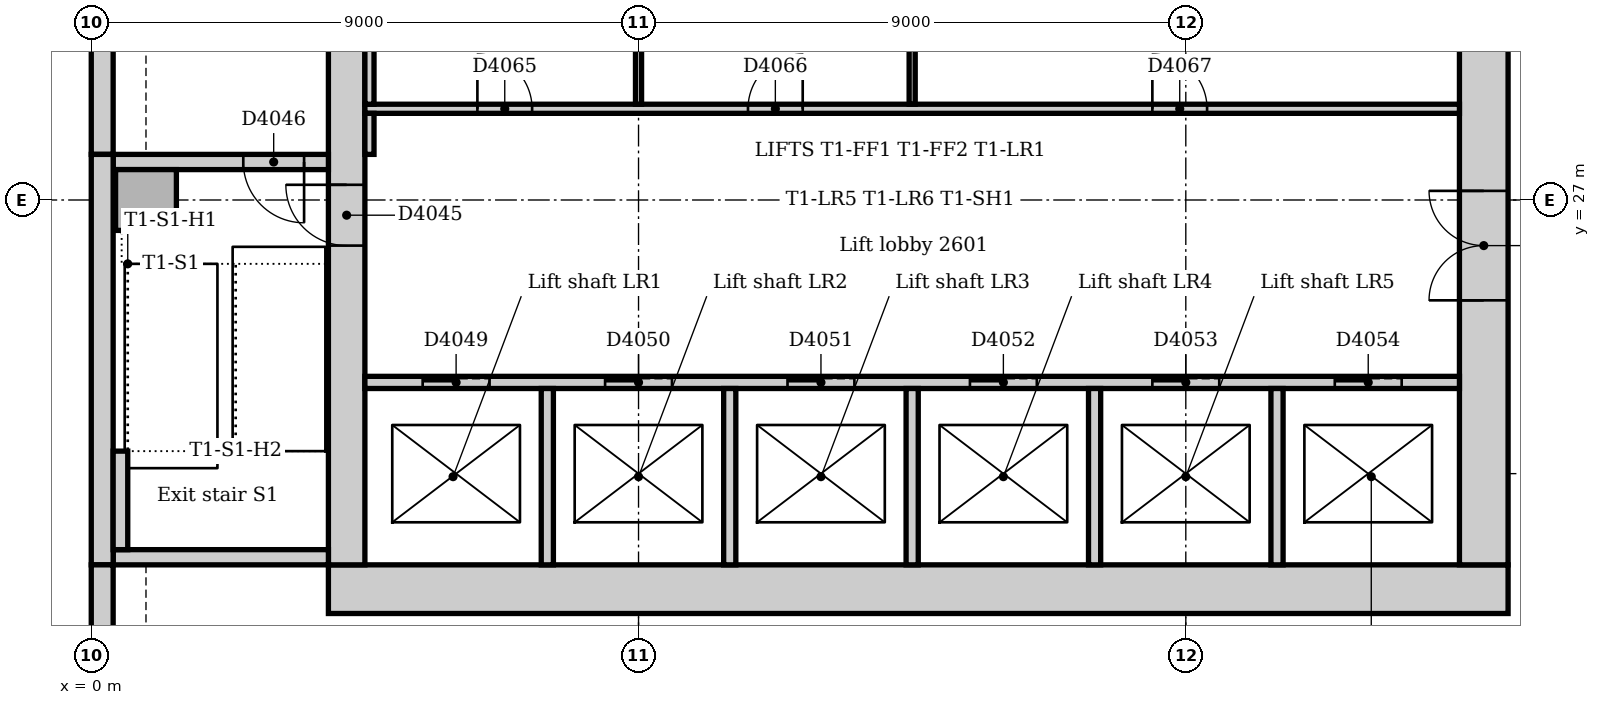
"""IFC4 building model, lengths in metres.
Left out: names, types, materials, properties, quantities, classifications, styles, units other than length and angle.
Written with IfcOpenShell. Run it as: python <this file> out.ifc"""

import sys

from ifc_helpers import new_model, si_unit, direction, frame, frame_2d, origin, origin_2d, place, context, subcontext, project, spatial, rectangle, extrude, element, fill, save


model = new_model("IFC4")
c1 = context("Model", 3, precision=1e-05, world=origin(), true_north=direction((0.0, 1.0)))
c2 = subcontext(c1, "Body", "Model", "MODEL_VIEW")
j1 = project(units=[si_unit("LENGTHUNIT", "METRE"), si_unit("PLANEANGLEUNIT", "RADIAN")], contexts=[c1])
p1 = place(None, origin())
s1 = spatial("IfcSite", under=j1, at=p1, CompositionType="ELEMENT")
p2 = place(p1, origin())
s2 = spatial("IfcBuilding", under=s1, at=p2, CompositionType="ELEMENT")
p3 = place(p2, frame((0.0, 0.0, 112.0)))
s3 = spatial("IfcBuildingStorey", under=s2, at=p3, CompositionType="ELEMENT", Elevation=112.0)
p4 = place(p3, frame((3.9, 20.6, 0.0), z_axis=(0.0, 0.0, 1.0), x_axis=(1.0, 0.0, 0.0)))
e1 = element("IfcWall", 1, at=p4, inside=s3, PredefinedType="SOLIDWALL", context=c2, shape_type="SweptSolid", body=[
    extrude(rectangle(XDim=19.4, YDim=0.8, at=frame_2d((9.7, 0.0))), origin(), (0.0, 0.0, 1.0), 4.0),
])
p5 = place(p3, frame((22.9, 21.0, 0.0), z_axis=(0.0, 0.0, 1.0), x_axis=(0.0, 1.0, 0.0)))
e2 = element("IfcWall", 2, at=p5, inside=s3, PredefinedType="SOLIDWALL", context=c2, shape_type="SweptSolid", body=[
    extrude(rectangle(XDim=10.5, YDim=0.8, at=frame_2d((5.25, 0.0))), origin(), (0.0, 0.0, 1.0), 4.0),
])
p6 = place(p5, frame((4.35, 0.0, 0.0)))
e3 = element("IfcOpeningElement", 3, at=p6, cuts=e2, PredefinedType="OPENING", context=c2, shape_type="SweptSolid", body=[
    extrude(rectangle(XDim=1.8, YDim=2.1, at=frame_2d((0.9, 1.05))), frame((0.0, 0.41, 0.0), z_axis=(0.0, -1.0, 0.0), x_axis=(1.0, 0.0, 0.0)), (0.0, 0.0, 1.0), 0.82),
])
p7 = place(p3, frame((4.2, 31.5, 0.0), z_axis=(0.0, 0.0, 1.0), x_axis=(0.0, -1.0, 0.0)))
e4 = element("IfcWall", 4, at=p7, inside=s3, PredefinedType="SOLIDWALL", context=c2, shape_type="SweptSolid", body=[
    extrude(rectangle(XDim=10.5, YDim=0.6, at=frame_2d((5.25, 0.0))), origin(), (0.0, 0.0, 1.0), 4.0),
])
p8 = place(p7, frame((4.25, 0.0, 0.0)))
e5 = element("IfcOpeningElement", 5, at=p8, cuts=e4, PredefinedType="OPENING", context=c2, shape_type="SweptSolid", body=[
    extrude(rectangle(XDim=1.0, YDim=2.1, at=frame_2d((0.5, 1.05))), frame((0.0, 0.31, 0.0), z_axis=(0.0, -1.0, 0.0), x_axis=(1.0, 0.0, 0.0)), (0.0, 0.0, 1.0), 0.62),
])
p9 = place(p3, frame((0.36, 21.125, 0.0), z_axis=(0.0, 0.0, 1.0), x_axis=(1.0, 0.0, 0.0)))
e6 = element("IfcWall", 6, at=p9, inside=s3, PredefinedType="SOLIDWALL", context=c2, shape_type="SweptSolid", body=[
    extrude(rectangle(XDim=3.54, YDim=0.25, at=frame_2d((1.77, 0.0))), origin(), (0.0, 0.0, 1.0), 4.0),
])
p10 = place(p3, frame((3.9, 27.625, 0.0), z_axis=(0.0, 0.0, 1.0), x_axis=(-1.0, 0.0, 0.0)))
e7 = element("IfcWall", 7, at=p10, inside=s3, PredefinedType="SOLIDWALL", context=c2, shape_type="SweptSolid", body=[
    extrude(rectangle(XDim=3.54, YDim=0.25, at=frame_2d((1.77, 0.0))), origin(), (0.0, 0.0, 1.0), 4.0),
])
p11 = place(p10, frame((0.4, 0.0, 0.0)))
e8 = element("IfcOpeningElement", 8, at=p11, cuts=e7, PredefinedType="OPENING", context=c2, shape_type="SweptSolid", body=[
    extrude(rectangle(XDim=1.0, YDim=2.1, at=frame_2d((0.5, 1.05))), frame((0.0, 0.135, 0.0), z_axis=(0.0, -1.0, 0.0), x_axis=(1.0, 0.0, 0.0)), (0.0, 0.0, 1.0), 0.27),
])
p12 = place(p3, frame((0.9, 27.0, 0.0), z_axis=(0.0, 0.0, 1.0), x_axis=(1.0, 0.0, 0.0)))
e9 = element("IfcColumn", 9, at=p12, inside=s3, PredefinedType="COLUMN", context=c2, shape_type="SweptSolid", body=[
    extrude(rectangle(XDim=1.0, YDim=1.0, at=origin_2d()), origin(), (0.0, 0.0, 1.0), 4.0),
])
p13 = place(p3, frame((0.18, 35.25, 0.0), z_axis=(0.0, 0.0, 1.0), x_axis=(0.0, -1.0, 0.0)))
e10 = element("IfcWall", 10, at=p13, inside=s3, PredefinedType="STANDARD", context=c2, shape_type="SweptSolid", body=[
    extrude(rectangle(XDim=7.5, YDim=0.36, at=frame_2d((3.75, 0.0))), origin(), (0.0, 0.0, 1.0), 3.85),
])
p14 = place(p3, frame((0.18, 27.75, 0.0), z_axis=(0.0, 0.0, 1.0), x_axis=(0.0, -1.0, 0.0)))
e11 = element("IfcWall", 11, at=p14, inside=s3, PredefinedType="STANDARD", context=c2, shape_type="SweptSolid", body=[
    extrude(rectangle(XDim=6.75, YDim=0.36, at=frame_2d((3.375, 0.0))), origin(), (0.0, 0.0, 1.0), 3.85),
])
p15 = place(p3, frame((0.18, 21.0, 0.0), z_axis=(0.0, 0.0, 1.0), x_axis=(0.0, -1.0, 0.0)))
e12 = element("IfcWall", 12, at=p15, inside=s3, PredefinedType="STANDARD", context=c2, shape_type="SweptSolid", body=[
    extrude(rectangle(XDim=12.257, YDim=0.36, at=frame_2d((6.129, 0.0))), origin(), (0.0, 0.0, 1.0), 3.85),
])
p16 = place(p15, frame((1.35, 0.0, 0.9)))
e13 = element("IfcOpeningElement", 13, at=p16, cuts=e12, PredefinedType="OPENING", context=c2, shape_type="SweptSolid", body=[
    extrude(rectangle(XDim=3.3, YDim=1.6, at=frame_2d((1.65, 0.8))), frame((0.0, 0.19, 0.0), z_axis=(0.0, -1.0, 0.0), x_axis=(1.0, 0.0, 0.0)), (0.0, 0.0, 1.0), 0.38),
])
p17 = place(p15, frame((5.85, 0.0, 0.9)))
e14 = element("IfcOpeningElement", 14, at=p17, cuts=e12, PredefinedType="OPENING", context=c2, shape_type="SweptSolid", body=[
    extrude(rectangle(XDim=3.3, YDim=1.6, at=frame_2d((1.65, 0.8))), frame((0.0, 0.19, 0.0), z_axis=(0.0, -1.0, 0.0), x_axis=(1.0, 0.0, 0.0)), (0.0, 0.0, 1.0), 0.38),
])
p18 = place(p3, frame((0.48, 21.25, 0.0), z_axis=(0.0, 0.0, 1.0), x_axis=(0.0, 1.0, 0.0)))
e15 = element("IfcWall", 15, at=p18, inside=s3, PredefinedType="STANDARD", context=c2, shape_type="SweptSolid", body=[
    extrude(rectangle(XDim=1.62, YDim=0.24, at=frame_2d((0.81, 0.0))), origin(), (0.0, 0.0, 1.0), 4.0),
])
p19 = place(p3, frame((4.5, 24.0, 0.0), z_axis=(0.0, 0.0, 1.0), x_axis=(1.0, 0.0, 0.0)))
e16 = element("IfcWall", 16, at=p19, inside=s3, PredefinedType="PARTITIONING", context=c2, shape_type="SweptSolid", body=[
    extrude(rectangle(XDim=18.0, YDim=0.2, at=frame_2d((9.0, 0.0))), origin(), (0.0, 0.0, 1.0), 3.85),
])
p20 = place(p19, frame((0.95, 0.0, 0.0)))
e17 = element("IfcOpeningElement", 17, at=p20, cuts=e16, PredefinedType="OPENING", context=c2, shape_type="SweptSolid", body=[
    extrude(rectangle(XDim=1.1, YDim=2.1, at=frame_2d((0.55, 1.05))), frame((0.0, 0.11, 0.0), z_axis=(0.0, -1.0, 0.0), x_axis=(1.0, 0.0, 0.0)), (0.0, 0.0, 1.0), 0.22),
])
p21 = place(p19, frame((3.95, 0.0, 0.0)))
e18 = element("IfcOpeningElement", 18, at=p21, cuts=e16, PredefinedType="OPENING", context=c2, shape_type="SweptSolid", body=[
    extrude(rectangle(XDim=1.1, YDim=2.1, at=frame_2d((0.55, 1.05))), frame((0.0, 0.11, 0.0), z_axis=(0.0, -1.0, 0.0), x_axis=(1.0, 0.0, 0.0)), (0.0, 0.0, 1.0), 0.22),
])
p22 = place(p19, frame((6.95, 0.0, 0.0)))
e19 = element("IfcOpeningElement", 19, at=p22, cuts=e16, PredefinedType="OPENING", context=c2, shape_type="SweptSolid", body=[
    extrude(rectangle(XDim=1.1, YDim=2.1, at=frame_2d((0.55, 1.05))), frame((0.0, 0.11, 0.0), z_axis=(0.0, -1.0, 0.0), x_axis=(1.0, 0.0, 0.0)), (0.0, 0.0, 1.0), 0.22),
])
p23 = place(p19, frame((9.95, 0.0, 0.0)))
e20 = element("IfcOpeningElement", 20, at=p23, cuts=e16, PredefinedType="OPENING", context=c2, shape_type="SweptSolid", body=[
    extrude(rectangle(XDim=1.1, YDim=2.1, at=frame_2d((0.55, 1.05))), frame((0.0, 0.11, 0.0), z_axis=(0.0, -1.0, 0.0), x_axis=(1.0, 0.0, 0.0)), (0.0, 0.0, 1.0), 0.22),
])
p24 = place(p19, frame((12.95, 0.0, 0.0)))
e21 = element("IfcOpeningElement", 21, at=p24, cuts=e16, PredefinedType="OPENING", context=c2, shape_type="SweptSolid", body=[
    extrude(rectangle(XDim=1.1, YDim=2.1, at=frame_2d((0.55, 1.05))), frame((0.0, 0.11, 0.0), z_axis=(0.0, -1.0, 0.0), x_axis=(1.0, 0.0, 0.0)), (0.0, 0.0, 1.0), 0.22),
])
p25 = place(p19, frame((15.95, 0.0, 0.0)))
e22 = element("IfcOpeningElement", 22, at=p25, cuts=e16, PredefinedType="OPENING", context=c2, shape_type="SweptSolid", body=[
    extrude(rectangle(XDim=1.1, YDim=2.1, at=frame_2d((0.55, 1.05))), frame((0.0, 0.11, 0.0), z_axis=(0.0, -1.0, 0.0), x_axis=(1.0, 0.0, 0.0)), (0.0, 0.0, 1.0), 0.22),
])
for number, where, z_axis, x_axis in (
    (23, (7.5, 21.0, 0.0), (0.0, 0.0, 1.0), (0.0, 1.0, 0.0)),
    (24, (10.5, 21.0, 0.0), (0.0, 0.0, 1.0), (0.0, 1.0, 0.0)),
    (25, (13.5, 21.0, 0.0), (0.0, 0.0, 1.0), (0.0, 1.0, 0.0)),
    (26, (16.5, 21.0, 0.0), (0.0, 0.0, 1.0), (0.0, 1.0, 0.0)),
    (27, (19.5, 21.0, 0.0), (0.0, 0.0, 1.0), (0.0, 1.0, 0.0)),
):
    element("IfcWall", number, at=place(p3, frame(where, z_axis=z_axis, x_axis=x_axis)), inside=s3, PredefinedType="PARTITIONING", context=c2, shape_type="SweptSolid", body=[
        extrude(rectangle(XDim=2.9, YDim=0.2, at=frame_2d((1.45, 0.0))), origin(), (0.0, 0.0, 1.0), 3.85),
    ])
p26 = place(p3, frame((4.5, 28.5, 0.0), z_axis=(0.0, 0.0, 1.0), x_axis=(1.0, 0.0, 0.0)))
e28 = element("IfcWall", 28, at=p26, inside=s3, PredefinedType="PARTITIONING", context=c2, shape_type="SweptSolid", body=[
    extrude(rectangle(XDim=18.0, YDim=0.15, at=frame_2d((9.0, 0.0))), origin(), (0.0, 0.0, 1.0), 3.85),
])
p27 = place(p26, frame((1.85, 0.0, 0.0)))
e29 = element("IfcOpeningElement", 29, at=p27, cuts=e28, PredefinedType="OPENING", context=c2, shape_type="SweptSolid", body=[
    extrude(rectangle(XDim=0.9, YDim=2.1, at=frame_2d((0.45, 1.05))), frame((0.0, 0.085, 0.0), z_axis=(0.0, -1.0, 0.0), x_axis=(1.0, 0.0, 0.0)), (0.0, 0.0, 1.0), 0.17),
])
p28 = place(p26, frame((6.3, 0.0, 0.0)))
e30 = element("IfcOpeningElement", 30, at=p28, cuts=e28, PredefinedType="OPENING", context=c2, shape_type="SweptSolid", body=[
    extrude(rectangle(XDim=0.9, YDim=2.1, at=frame_2d((0.45, 1.05))), frame((0.0, 0.085, 0.0), z_axis=(0.0, -1.0, 0.0), x_axis=(1.0, 0.0, 0.0)), (0.0, 0.0, 1.0), 0.17),
])
p29 = place(p26, frame((12.95, 0.0, 0.0)))
e31 = element("IfcOpeningElement", 31, at=p29, cuts=e28, PredefinedType="OPENING", context=c2, shape_type="SweptSolid", body=[
    extrude(rectangle(XDim=0.9, YDim=2.1, at=frame_2d((0.45, 1.05))), frame((0.0, 0.085, 0.0), z_axis=(0.0, -1.0, 0.0), x_axis=(1.0, 0.0, 0.0)), (0.0, 0.0, 1.0), 0.17),
])
p30 = place(p3, frame((4.575, 27.75, 0.0), z_axis=(0.0, 0.0, 1.0), x_axis=(0.0, 1.0, 0.0)))
e32 = element("IfcWall", 32, at=p30, inside=s3, PredefinedType="PARTITIONING", context=c2, shape_type="SweptSolid", body=[
    extrude(rectangle(XDim=0.675, YDim=0.15, at=frame_2d((0.338, 0.0))), origin(), (0.0, 0.0, 1.0), 3.85),
])
p31 = place(p3, frame((4.575, 28.575, 0.0), z_axis=(0.0, 0.0, 1.0), x_axis=(0.0, 1.0, 0.0)))
e33 = element("IfcWall", 33, at=p31, inside=s3, PredefinedType="PARTITIONING", context=c2, shape_type="SweptSolid", body=[
    extrude(rectangle(XDim=2.675, YDim=0.15, at=frame_2d((1.337, 0.0))), origin(), (0.0, 0.0, 1.0), 3.85),
])
for number, where, z_axis, x_axis in (
    (34, (9.0, 28.575, 0.0), (0.0, 0.0, 1.0), (0.0, 1.0, 0.0)),
    (35, (13.5, 28.575, 0.0), (0.0, 0.0, 1.0), (0.0, 1.0, 0.0)),
):
    element("IfcWall", number, at=place(p3, frame(where, z_axis=z_axis, x_axis=x_axis)), inside=s3, PredefinedType="PARTITIONING", context=c2, shape_type="SweptSolid", body=[
        extrude(rectangle(XDim=2.675, YDim=0.1, at=frame_2d((1.337, 0.0))), origin(), (0.0, 0.0, 1.0), 3.85),
    ])
p32 = place(p8, frame((1.0, 0.0, 0.0), z_axis=(0.0, 0.0, 1.0), x_axis=(-1.0, 0.0, 0.0)))
e36 = element("IfcDoor", 36, at=p32, inside=s3, OperationType="SINGLE_SWING_RIGHT", PredefinedType="DOOR", context=c2, shape_type="SweptSolid", body=[
    extrude(rectangle(XDim=1.0, YDim=2.1, at=frame_2d((0.5, 1.05))), frame((0.0, 0.025, 0.0), z_axis=(0.0, -1.0, 0.0), x_axis=(1.0, 0.0, 0.0)), (0.0, 0.0, 1.0), 0.05),
])
fill(e5, e36)
p33 = place(p11, origin())
e37 = element("IfcDoor", 37, at=p33, inside=s3, OperationType="SINGLE_SWING_LEFT", PredefinedType="DOOR", context=c2, shape_type="SweptSolid", body=[
    extrude(rectangle(XDim=1.0, YDim=2.1, at=frame_2d((0.5, 1.05))), frame((0.0, 0.025, 0.0), z_axis=(0.0, -1.0, 0.0), x_axis=(1.0, 0.0, 0.0)), (0.0, 0.0, 1.0), 0.05),
])
fill(e8, e37)
p34 = place(p20, origin())
e38 = element("IfcDoor", 38, at=p34, inside=s3, OperationType="SLIDING_TO_LEFT", PredefinedType="DOOR", context=c2, shape_type="SweptSolid", body=[
    extrude(rectangle(XDim=1.1, YDim=2.1, at=frame_2d((0.55, 1.05))), frame((0.0, 0.025, 0.0), z_axis=(0.0, -1.0, 0.0), x_axis=(1.0, 0.0, 0.0)), (0.0, 0.0, 1.0), 0.05),
])
fill(e17, e38)
p35 = place(p21, origin())
e39 = element("IfcDoor", 39, at=p35, inside=s3, OperationType="SLIDING_TO_LEFT", PredefinedType="DOOR", context=c2, shape_type="SweptSolid", body=[
    extrude(rectangle(XDim=1.1, YDim=2.1, at=frame_2d((0.55, 1.05))), frame((0.0, 0.025, 0.0), z_axis=(0.0, -1.0, 0.0), x_axis=(1.0, 0.0, 0.0)), (0.0, 0.0, 1.0), 0.05),
])
fill(e18, e39)
p36 = place(p22, origin())
e40 = element("IfcDoor", 40, at=p36, inside=s3, OperationType="SLIDING_TO_LEFT", PredefinedType="DOOR", context=c2, shape_type="SweptSolid", body=[
    extrude(rectangle(XDim=1.1, YDim=2.1, at=frame_2d((0.55, 1.05))), frame((0.0, 0.025, 0.0), z_axis=(0.0, -1.0, 0.0), x_axis=(1.0, 0.0, 0.0)), (0.0, 0.0, 1.0), 0.05),
])
fill(e19, e40)
p37 = place(p23, origin())
e41 = element("IfcDoor", 41, at=p37, inside=s3, OperationType="SLIDING_TO_LEFT", PredefinedType="DOOR", context=c2, shape_type="SweptSolid", body=[
    extrude(rectangle(XDim=1.1, YDim=2.1, at=frame_2d((0.55, 1.05))), frame((0.0, 0.025, 0.0), z_axis=(0.0, -1.0, 0.0), x_axis=(1.0, 0.0, 0.0)), (0.0, 0.0, 1.0), 0.05),
])
fill(e20, e41)
p38 = place(p24, origin())
e42 = element("IfcDoor", 42, at=p38, inside=s3, OperationType="SLIDING_TO_LEFT", PredefinedType="DOOR", context=c2, shape_type="SweptSolid", body=[
    extrude(rectangle(XDim=1.1, YDim=2.1, at=frame_2d((0.55, 1.05))), frame((0.0, 0.025, 0.0), z_axis=(0.0, -1.0, 0.0), x_axis=(1.0, 0.0, 0.0)), (0.0, 0.0, 1.0), 0.05),
])
fill(e21, e42)
p39 = place(p25, origin())
e43 = element("IfcDoor", 43, at=p39, inside=s3, OperationType="SLIDING_TO_LEFT", PredefinedType="DOOR", context=c2, shape_type="SweptSolid", body=[
    extrude(rectangle(XDim=1.1, YDim=2.1, at=frame_2d((0.55, 1.05))), frame((0.0, 0.025, 0.0), z_axis=(0.0, -1.0, 0.0), x_axis=(1.0, 0.0, 0.0)), (0.0, 0.0, 1.0), 0.05),
])
fill(e22, e43)
p40 = place(p6, origin())
e44 = element("IfcDoor", 44, at=p40, inside=s3, OperationType="DOUBLE_DOOR_DOUBLE_SWING", PredefinedType="DOOR", context=c2, shape_type="SweptSolid", body=[
    extrude(rectangle(XDim=1.8, YDim=2.1, at=frame_2d((0.9, 1.05))), frame((0.0, 0.025, 0.0), z_axis=(0.0, -1.0, 0.0), x_axis=(1.0, 0.0, 0.0)), (0.0, 0.0, 1.0), 0.05),
])
fill(e3, e44)
p41 = place(p27, origin())
e45 = element("IfcDoor", 45, at=p41, inside=s3, OperationType="SINGLE_SWING_LEFT", PredefinedType="DOOR", context=c2, shape_type="SweptSolid", body=[
    extrude(rectangle(XDim=0.9, YDim=2.1, at=frame_2d((0.45, 1.05))), frame((0.0, 0.025, 0.0), z_axis=(0.0, -1.0, 0.0), x_axis=(1.0, 0.0, 0.0)), (0.0, 0.0, 1.0), 0.05),
])
fill(e29, e45)
p42 = place(p28, origin())
e46 = element("IfcDoor", 46, at=p42, inside=s3, OperationType="SINGLE_SWING_RIGHT", PredefinedType="DOOR", context=c2, shape_type="SweptSolid", body=[
    extrude(rectangle(XDim=0.9, YDim=2.1, at=frame_2d((0.45, 1.05))), frame((0.0, 0.025, 0.0), z_axis=(0.0, -1.0, 0.0), x_axis=(1.0, 0.0, 0.0)), (0.0, 0.0, 1.0), 0.05),
])
fill(e30, e46)
p43 = place(p29, origin())
e47 = element("IfcDoor", 47, at=p43, inside=s3, OperationType="SINGLE_SWING_LEFT", PredefinedType="DOOR", context=c2, shape_type="SweptSolid", body=[
    extrude(rectangle(XDim=0.9, YDim=2.1, at=frame_2d((0.45, 1.05))), frame((0.0, 0.025, 0.0), z_axis=(0.0, -1.0, 0.0), x_axis=(1.0, 0.0, 0.0)), (0.0, 0.0, 1.0), 0.05),
])
fill(e31, e47)
save(model, sys.argv[1])
